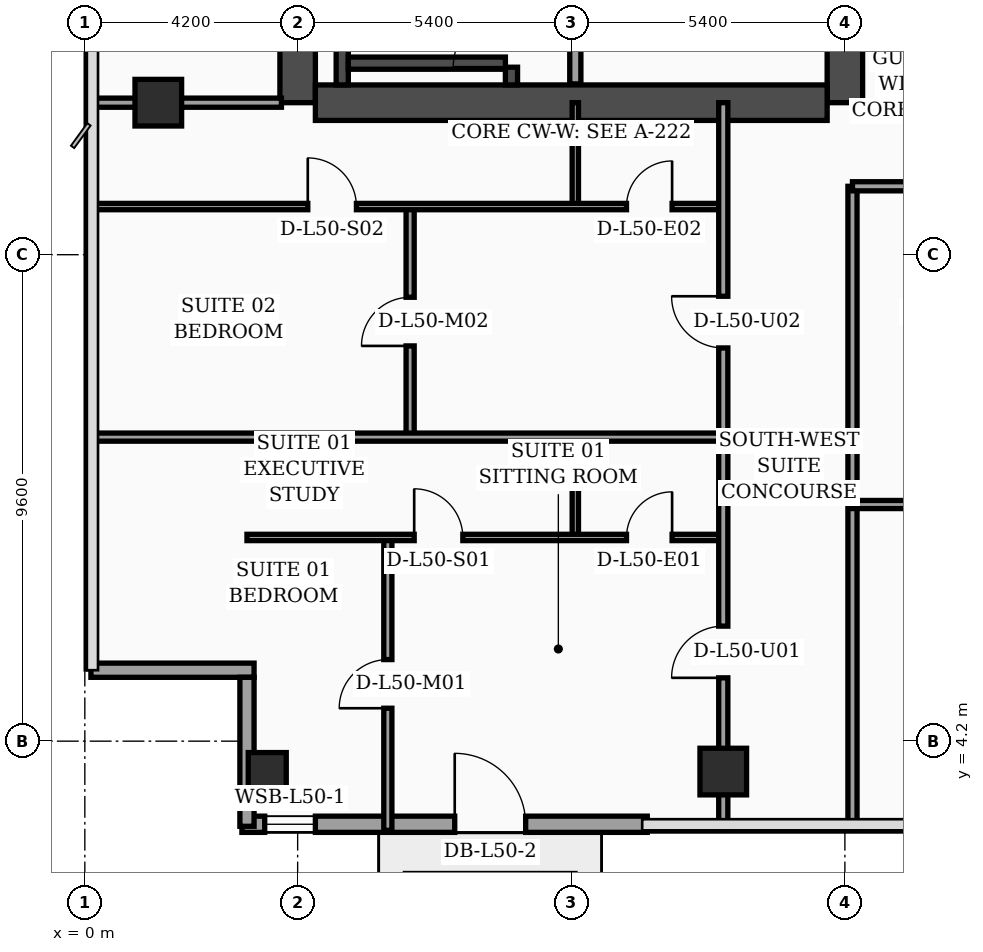
"""IFC4 building model, lengths in metres.
Left out: names, types, materials, properties, quantities, classifications, styles, units other than length and angle.
Written with IfcOpenShell. Run it as: python <this file> out.ifc"""

import sys

from ifc_helpers import new_model, si_unit, direction, frame, frame_2d, origin, origin_2d, place, context, subcontext, project, spatial, rectangle, hollow_rectangle, extrude, element, fill, save


model = new_model("IFC4")
c1 = context("Model", 3, precision=1e-05, world=origin(), true_north=direction((0.0, 1.0)))
c2 = subcontext(c1, "Body", "Model", "MODEL_VIEW")
j1 = project(units=[si_unit("LENGTHUNIT", "METRE"), si_unit("PLANEANGLEUNIT", "RADIAN")], contexts=[c1])
p1 = place(None, origin())
s1 = spatial("IfcSite", under=j1, at=p1, CompositionType="ELEMENT")
p2 = place(p1, origin())
s2 = spatial("IfcBuilding", under=s1, at=p2, CompositionType="ELEMENT")
p3 = place(p2, frame((0.0, 0.0, 203.4)))
s3 = spatial("IfcBuildingStorey", under=s2, at=p3, CompositionType="ELEMENT", Elevation=203.4)
p4 = place(p3, frame((4.2, 16.8, 0.0), z_axis=(0.0, 0.0, 1.0), x_axis=(0.0, 1.0, 0.0)))
e1 = element("IfcWall", 1, at=p4, inside=s3, PredefinedType="SHEAR", context=c2, shape_type="SweptSolid", body=[
    extrude(rectangle(XDim=21.6, YDim=0.7, at=frame_2d((10.8, 0.0))), origin(), (0.0, 0.0, 1.0), 3.56),
])
p5 = place(p3, frame((15.0, 16.8, 0.0), z_axis=(0.0, 0.0, 1.0), x_axis=(0.0, 1.0, 0.0)))
e2 = element("IfcWall", 2, at=p5, inside=s3, PredefinedType="SHEAR", context=c2, shape_type="SweptSolid", body=[
    extrude(rectangle(XDim=21.6, YDim=0.7, at=frame_2d((10.8, 0.0))), origin(), (0.0, 0.0, 1.0), 3.56),
])
p6 = place(p5, frame((8.65, 0.0, 0.0)))
e3 = element("IfcOpeningElement", 3, at=p6, cuts=e2, PredefinedType="OPENING", context=c2, shape_type="SweptSolid", body=[
    extrude(rectangle(XDim=1.1, YDim=2.2, at=frame_2d((0.55, 1.1))), frame((0.0, 0.36, 0.0), z_axis=(0.0, -1.0, 0.0), x_axis=(1.0, 0.0, 0.0)), (0.0, 0.0, 1.0), 0.72),
])
p7 = place(p5, frame((10.85, 0.0, 0.0)))
e4 = element("IfcOpeningElement", 4, at=p7, cuts=e2, PredefinedType="OPENING", context=c2, shape_type="SweptSolid", body=[
    extrude(rectangle(XDim=1.1, YDim=2.2, at=frame_2d((0.55, 1.1))), frame((0.0, 0.36, 0.0), z_axis=(0.0, -1.0, 0.0), x_axis=(1.0, 0.0, 0.0)), (0.0, 0.0, 1.0), 0.72),
])
p8 = place(p5, frame((13.5, 0.0, 0.0)))
e5 = element("IfcOpeningElement", 5, at=p8, cuts=e2, PredefinedType="OPENING", context=c2, shape_type="SweptSolid", body=[
    extrude(rectangle(XDim=1.1, YDim=2.2, at=frame_2d((0.55, 1.1))), frame((0.0, 0.36, 0.0), z_axis=(0.0, -1.0, 0.0), x_axis=(1.0, 0.0, 0.0)), (0.0, 0.0, 1.0), 0.72),
])
p9 = place(p5, frame((16.15, 0.0, 0.0)))
e6 = element("IfcOpeningElement", 6, at=p9, cuts=e2, PredefinedType="OPENING", context=c2, shape_type="SweptSolid", body=[
    extrude(rectangle(XDim=1.1, YDim=2.2, at=frame_2d((0.55, 1.1))), frame((0.0, 0.36, 0.0), z_axis=(0.0, -1.0, 0.0), x_axis=(1.0, 0.0, 0.0)), (0.0, 0.0, 1.0), 0.72),
])
p10 = place(p3, frame((4.55, 16.8, 0.0), z_axis=(0.0, 0.0, 1.0), x_axis=(1.0, 0.0, 0.0)))
e7 = element("IfcWall", 7, at=p10, inside=s3, PredefinedType="SHEAR", context=c2, shape_type="SweptSolid", body=[
    extrude(rectangle(XDim=10.1, YDim=0.7, at=frame_2d((5.05, 0.0))), origin(), (0.0, 0.0, 1.0), 3.56),
])
p11 = place(p3, frame((5.08, 17.15, 0.0), z_axis=(0.0, 0.0, 1.0), x_axis=(0.0, 1.0, 0.0)))
e8 = element("IfcWall", 8, at=p11, inside=s3, PredefinedType="SOLIDWALL", context=c2, shape_type="SweptSolid", body=[
    extrude(rectangle(XDim=9.64, YDim=0.24, at=frame_2d((4.82, 0.0))), origin(), (0.0, 0.0, 1.0), 3.56),
])
p12 = place(p3, frame((8.42, 17.15, 0.0), z_axis=(0.0, 0.0, 1.0), x_axis=(0.0, 1.0, 0.0)))
e9 = element("IfcWall", 9, at=p12, inside=s3, PredefinedType="SOLIDWALL", context=c2, shape_type="SweptSolid", body=[
    extrude(rectangle(XDim=9.64, YDim=0.24, at=frame_2d((4.82, 0.0))), origin(), (0.0, 0.0, 1.0), 3.56),
])
p13 = place(p12, frame((0.35, 0.0, 0.0)))
e10 = element("IfcOpeningElement", 10, at=p13, cuts=e9, PredefinedType="OPENING", context=c2, shape_type="SweptSolid", body=[
    extrude(rectangle(XDim=1.15, YDim=2.2, at=frame_2d((0.575, 1.1))), frame((0.0, 0.13, 0.0), z_axis=(0.0, -1.0, 0.0), x_axis=(1.0, 0.0, 0.0)), (0.0, 0.0, 1.0), 0.26),
])
p14 = place(p3, frame((5.2, 17.58, 0.0), z_axis=(0.0, 0.0, 1.0), x_axis=(1.0, 0.0, 0.0)))
e11 = element("IfcWall", 11, at=p14, inside=s3, PredefinedType="SOLIDWALL", context=c2, shape_type="SweptSolid", body=[
    extrude(rectangle(XDim=3.1, YDim=0.24, at=frame_2d((1.55, 0.0))), origin(), (0.0, 0.0, 1.0), 3.56),
])
p15 = place(p3, frame((3.6, 3.6, 0.0), z_axis=(0.0, 0.0, 1.0), x_axis=(1.0, 0.0, 0.0)))
e12 = element("IfcColumn", 12, at=p15, inside=s3, PredefinedType="COLUMN", context=c2, shape_type="SweptSolid", body=[
    extrude(hollow_rectangle(XDim=0.75, YDim=0.75, WallThickness=0.032, at=origin_2d()), origin(), (0.0, 0.0, 1.0), 3.56),
])
for number, where, z_axis, x_axis in (
    (13, (1.45, 16.8, 0.0), (0.0, 0.0, 1.0), (1.0, 0.0, 0.0)),
    (14, (12.6, 3.6, 0.0), (0.0, 0.0, 1.0), (1.0, 0.0, 0.0)),
):
    element("IfcColumn", number, at=place(p3, frame(where, z_axis=z_axis, x_axis=x_axis)), inside=s3, PredefinedType="COLUMN", context=c2, shape_type="SweptSolid", body=[
        extrude(rectangle(XDim=0.92, YDim=0.92, at=origin_2d()), origin(), (0.0, 0.0, 1.0), 3.56),
    ])
p16 = place(p3, frame((3.1, 2.56, 0.0), z_axis=(0.0, 0.0, 1.0), x_axis=(1.0, 0.0, 0.0)))
e15 = element("IfcWall", 15, at=p16, inside=s3, PredefinedType="SOLIDWALL", context=c2, shape_type="SweptSolid", body=[
    extrude(rectangle(XDim=8.0, YDim=0.32, at=frame_2d((4.0, 0.0))), origin(), (0.0, 0.0, 1.0), 3.56),
])
p17 = place(p16, frame((0.45, 0.0, 0.75)))
e16 = element("IfcOpeningElement", 16, at=p17, cuts=e15, PredefinedType="OPENING", context=c2, shape_type="SweptSolid", body=[
    extrude(rectangle(XDim=1.0, YDim=1.6, at=frame_2d((0.5, 0.8))), frame((0.0, 0.17, 0.0), z_axis=(0.0, -1.0, 0.0), x_axis=(1.0, 0.0, 0.0)), (0.0, 0.0, 1.0), 0.34),
])
p18 = place(p16, frame((4.2, 0.0, 0.0)))
e17 = element("IfcOpeningElement", 17, at=p18, cuts=e15, PredefinedType="OPENING", context=c2, shape_type="SweptSolid", body=[
    extrude(rectangle(XDim=1.4, YDim=2.25, at=frame_2d((0.7, 1.125))), frame((0.0, 0.17, 0.0), z_axis=(0.0, -1.0, 0.0), x_axis=(1.0, 0.0, 0.0)), (0.0, 0.0, 1.0), 0.34),
])
p19 = place(p3, frame((0.12, 5.6, 0.0), z_axis=(0.0, 0.0, 1.0), x_axis=(1.0, 0.0, 0.0)))
e18 = element("IfcWall", 18, at=p19, inside=s3, PredefinedType="SOLIDWALL", context=c2, shape_type="SweptSolid", body=[
    extrude(rectangle(XDim=3.22, YDim=0.28, at=frame_2d((1.61, 0.0))), origin(), (0.0, 0.0, 1.0), 2.94),
])
p20 = place(p3, frame((3.2, 5.46, 0.0), z_axis=(0.0, 0.0, 1.0), x_axis=(0.0, -1.0, 0.0)))
e19 = element("IfcWall", 19, at=p20, inside=s3, PredefinedType="SOLIDWALL", context=c2, shape_type="SweptSolid", body=[
    extrude(rectangle(XDim=2.94, YDim=0.28, at=frame_2d((1.47, 0.0))), origin(), (0.0, 0.0, 1.0), 2.94),
])
p21 = place(p3, frame((9.68, 17.17, 0.0), z_axis=(0.0, 0.0, 1.0), x_axis=(0.0, 1.0, 0.0)))
e20 = element("IfcWall", 20, at=p21, inside=s3, PredefinedType="SOLIDWALL", context=c2, shape_type="SweptSolid", body=[
    extrude(rectangle(XDim=7.83, YDim=0.22, at=frame_2d((3.915, 0.0))), origin(), (0.0, 0.0, 1.0), 3.56),
])
p22 = place(p3, frame((0.08, 16.8, 0.0), z_axis=(0.0, 0.0, 1.0), x_axis=(1.0, 0.0, 0.0)))
e21 = element("IfcWall", 21, at=p22, inside=s3, PredefinedType="PARTITIONING", context=c2, shape_type="SweptSolid", body=[
    extrude(rectangle(XDim=3.8, YDim=0.18, at=frame_2d((1.9, 0.0))), origin(), (0.0, 0.0, 1.0), 2.94),
])
p23 = place(p3, frame((9.68, 8.22, 0.0), z_axis=(0.0, 0.0, 1.0), x_axis=(0.0, 1.0, 0.0)))
e22 = element("IfcWall", 22, at=p23, inside=s3, PredefinedType="PARTITIONING", context=c2, shape_type="SweptSolid", body=[
    extrude(rectangle(XDim=1.98, YDim=0.125, at=frame_2d((0.99, 0.0))), origin(), (0.0, 0.0, 1.0), 3.09),
])
p24 = place(p3, frame((5.98, 2.44, 0.0), z_axis=(0.0, 0.0, 1.0), x_axis=(0.0, 1.0, 0.0)))
e23 = element("IfcWall", 23, at=p24, inside=s3, PredefinedType="PARTITIONING", context=c2, shape_type="SweptSolid", body=[
    extrude(rectangle(XDim=5.78, YDim=0.16, at=frame_2d((2.89, 0.0))), origin(), (0.0, 0.0, 1.0), 3.09),
])
p25 = place(p24, frame((2.41, 0.0, 0.0)))
e24 = element("IfcOpeningElement", 24, at=p25, cuts=e23, PredefinedType="OPENING", context=c2, shape_type="SweptSolid", body=[
    extrude(rectangle(XDim=0.96, YDim=2.2, at=frame_2d((0.48, 1.1))), frame((0.0, 0.09, 0.0), z_axis=(0.0, -1.0, 0.0), x_axis=(1.0, 0.0, 0.0)), (0.0, 0.0, 1.0), 0.18),
])
p26 = place(p3, frame((3.2, 8.22, 0.0), z_axis=(0.0, 0.0, 1.0), x_axis=(1.0, 0.0, 0.0)))
e25 = element("IfcWall", 25, at=p26, inside=s3, PredefinedType="PARTITIONING", context=c2, shape_type="SweptSolid", body=[
    extrude(rectangle(XDim=9.4, YDim=0.125, at=frame_2d((4.7, 0.0))), origin(), (0.0, 0.0, 1.0), 2.94),
])
p27 = place(p26, frame((3.3, 0.0, 0.0)))
e26 = element("IfcOpeningElement", 26, at=p27, cuts=e25, PredefinedType="OPENING", context=c2, shape_type="SweptSolid", body=[
    extrude(rectangle(XDim=0.96, YDim=2.2, at=frame_2d((0.48, 1.1))), frame((0.0, 0.073, 0.0), z_axis=(0.0, -1.0, 0.0), x_axis=(1.0, 0.0, 0.0)), (0.0, 0.0, 1.0), 0.145),
])
p28 = place(p26, frame((7.49, 0.0, 0.0)))
e27 = element("IfcOpeningElement", 27, at=p28, cuts=e25, PredefinedType="OPENING", context=c2, shape_type="SweptSolid", body=[
    extrude(rectangle(XDim=0.9, YDim=2.15, at=frame_2d((0.45, 1.075))), frame((0.0, 0.073, 0.0), z_axis=(0.0, -1.0, 0.0), x_axis=(1.0, 0.0, 0.0)), (0.0, 0.0, 1.0), 0.145),
])
p29 = place(p3, frame((9.68, 14.75, 0.0), z_axis=(0.0, 0.0, 1.0), x_axis=(0.0, 1.0, 0.0)))
e28 = element("IfcWall", 28, at=p29, inside=s3, PredefinedType="PARTITIONING", context=c2, shape_type="SweptSolid", body=[
    extrude(rectangle(XDim=2.05, YDim=0.125, at=frame_2d((1.025, 0.0))), origin(), (0.0, 0.0, 1.0), 3.56),
])
p30 = place(p3, frame((6.42, 10.2, 0.0), z_axis=(0.0, 0.0, 1.0), x_axis=(0.0, 1.0, 0.0)))
e29 = element("IfcWall", 29, at=p30, inside=s3, PredefinedType="PARTITIONING", context=c2, shape_type="SweptSolid", body=[
    extrude(rectangle(XDim=4.55, YDim=0.16, at=frame_2d((2.275, 0.0))), origin(), (0.0, 0.0, 1.0), 3.14),
])
p31 = place(p30, frame((1.8, 0.0, 0.0)))
e30 = element("IfcOpeningElement", 30, at=p31, cuts=e29, PredefinedType="OPENING", context=c2, shape_type="SweptSolid", body=[
    extrude(rectangle(XDim=0.96, YDim=2.2, at=frame_2d((0.48, 1.1))), frame((0.0, 0.09, 0.0), z_axis=(0.0, -1.0, 0.0), x_axis=(1.0, 0.0, 0.0)), (0.0, 0.0, 1.0), 0.18),
])
p32 = place(p3, frame((0.08, 14.75, 0.0), z_axis=(0.0, 0.0, 1.0), x_axis=(1.0, 0.0, 0.0)))
e31 = element("IfcWall", 31, at=p32, inside=s3, PredefinedType="PARTITIONING", context=c2, shape_type="SweptSolid", body=[
    extrude(rectangle(XDim=12.52, YDim=0.125, at=frame_2d((6.26, 0.0))), origin(), (0.0, 0.0, 1.0), 2.94),
])
p33 = place(p32, frame((4.32, 0.0, 0.0)))
e32 = element("IfcOpeningElement", 32, at=p33, cuts=e31, PredefinedType="OPENING", context=c2, shape_type="SweptSolid", body=[
    extrude(rectangle(XDim=0.96, YDim=2.2, at=frame_2d((0.48, 1.1))), frame((0.0, 0.073, 0.0), z_axis=(0.0, -1.0, 0.0), x_axis=(1.0, 0.0, 0.0)), (0.0, 0.0, 1.0), 0.145),
])
p34 = place(p32, frame((10.61, 0.0, 0.0)))
e33 = element("IfcOpeningElement", 33, at=p34, cuts=e31, PredefinedType="OPENING", context=c2, shape_type="SweptSolid", body=[
    extrude(rectangle(XDim=0.9, YDim=2.15, at=frame_2d((0.45, 1.075))), frame((0.0, 0.073, 0.0), z_axis=(0.0, -1.0, 0.0), x_axis=(1.0, 0.0, 0.0)), (0.0, 0.0, 1.0), 0.145),
])
p35 = place(p3, frame((0.08, 10.2, 0.0), z_axis=(0.0, 0.0, 1.0), x_axis=(1.0, 0.0, 0.0)))
e34 = element("IfcWall", 34, at=p35, inside=s3, PredefinedType="PARTITIONING", context=c2, shape_type="SweptSolid", body=[
    extrude(rectangle(XDim=12.52, YDim=0.16, at=frame_2d((6.26, 0.0))), origin(), (0.0, 0.0, 1.0), 2.94),
])
p36 = place(p3, frame((12.6, 2.44, 0.0), z_axis=(0.0, 0.0, 1.0), x_axis=(0.0, 1.0, 0.0)))
e35 = element("IfcWall", 35, at=p36, inside=s3, PredefinedType="PARTITIONING", context=c2, shape_type="SweptSolid", body=[
    extrude(rectangle(XDim=14.36, YDim=0.18, at=frame_2d((7.18, 0.0))), origin(), (0.0, 0.0, 1.0), 2.94),
])
p37 = place(p36, frame((3.01, 0.0, 0.0)))
e36 = element("IfcOpeningElement", 36, at=p37, cuts=e35, PredefinedType="OPENING", context=c2, shape_type="SweptSolid", body=[
    extrude(rectangle(XDim=1.02, YDim=2.2, at=frame_2d((0.51, 1.1))), frame((0.0, 0.1, 0.0), z_axis=(0.0, -1.0, 0.0), x_axis=(1.0, 0.0, 0.0)), (0.0, 0.0, 1.0), 0.2),
])
p38 = place(p36, frame((9.52, 0.0, 0.0)))
e37 = element("IfcOpeningElement", 37, at=p38, cuts=e35, PredefinedType="OPENING", context=c2, shape_type="SweptSolid", body=[
    extrude(rectangle(XDim=1.02, YDim=2.2, at=frame_2d((0.51, 1.1))), frame((0.0, 0.1, 0.0), z_axis=(0.0, -1.0, 0.0), x_axis=(1.0, 0.0, 0.0)), (0.0, 0.0, 1.0), 0.2),
])
p39 = place(p3, frame((15.15, 2.44, 0.0), z_axis=(0.0, 0.0, 1.0), x_axis=(0.0, 1.0, 0.0)))
e38 = element("IfcWall", 38, at=p39, inside=s3, PredefinedType="PARTITIONING", context=c2, shape_type="SweptSolid", body=[
    extrude(rectangle(XDim=12.71, YDim=0.18, at=frame_2d((6.355, 0.0))), origin(), (0.0, 0.0, 1.0), 3.09),
])
p40 = place(p3, frame((15.15, 8.87, 0.0), z_axis=(0.0, 0.0, 1.0), x_axis=(1.0, 0.0, 0.0)))
e39 = element("IfcWall", 39, at=p40, inside=s3, PredefinedType="PARTITIONING", context=c2, shape_type="SweptSolid", body=[
    extrude(rectangle(XDim=4.45, YDim=0.16, at=frame_2d((2.225, 0.0))), origin(), (0.0, 0.0, 1.0), 3.56),
])
p41 = place(p40, frame((1.75, 0.0, 0.0)))
e40 = element("IfcOpeningElement", 40, at=p41, cuts=e39, PredefinedType="OPENING", context=c2, shape_type="SweptSolid", body=[
    extrude(rectangle(XDim=0.96, YDim=2.2, at=frame_2d((0.48, 1.1))), frame((0.0, 0.09, 0.0), z_axis=(0.0, -1.0, 0.0), x_axis=(1.0, 0.0, 0.0)), (0.0, 0.0, 1.0), 0.18),
])
p42 = place(p3, frame((15.15, 15.15, 0.0), z_axis=(0.0, 0.0, 1.0), x_axis=(1.0, 0.0, 0.0)))
e41 = element("IfcWall", 41, at=p42, inside=s3, PredefinedType="PARTITIONING", context=c2, shape_type="SweptSolid", body=[
    extrude(rectangle(XDim=6.45, YDim=0.18, at=frame_2d((3.225, 0.0))), origin(), (0.0, 0.0, 1.0), 2.59),
])
p43 = place(p42, frame((1.74, 0.0, 0.0)))
e42 = element("IfcOpeningElement", 42, at=p43, cuts=e41, PredefinedType="OPENING", context=c2, shape_type="SweptSolid", body=[
    extrude(rectangle(XDim=1.02, YDim=2.2, at=frame_2d((0.51, 1.1))), frame((0.0, 0.1, 0.0), z_axis=(0.0, -1.0, 0.0), x_axis=(1.0, 0.0, 0.0)), (0.0, 0.0, 1.0), 0.2),
])
p44 = place(p17, origin())
e43 = element("IfcWindow", 43, at=p44, inside=s3, PartitioningType="SINGLE_PANEL", PredefinedType="WINDOW", context=c2, shape_type="SweptSolid", body=[
    extrude(rectangle(XDim=1.0, YDim=1.6, at=frame_2d((0.5, 0.8))), frame((0.0, 0.03, 0.0), z_axis=(0.0, -1.0, 0.0), x_axis=(1.0, 0.0, 0.0)), (0.0, 0.0, 1.0), 0.06),
])
fill(e16, e43)
p45 = place(p18, origin())
e44 = element("IfcDoor", 44, at=p45, inside=s3, OperationType="SINGLE_SWING_LEFT", PredefinedType="DOOR", context=c2, shape_type="SweptSolid", body=[
    extrude(rectangle(XDim=1.4, YDim=2.25, at=frame_2d((0.7, 1.125))), frame((0.0, 0.025, 0.0), z_axis=(0.0, -1.0, 0.0), x_axis=(1.0, 0.0, 0.0)), (0.0, 0.0, 1.0), 0.05),
])
fill(e17, e44)
p46 = place(p25, origin())
e45 = element("IfcDoor", 45, at=p46, inside=s3, OperationType="SINGLE_SWING_LEFT", PredefinedType="DOOR", context=c2, shape_type="SweptSolid", body=[
    extrude(rectangle(XDim=0.96, YDim=2.2, at=frame_2d((0.48, 1.1))), frame((0.0, 0.025, 0.0), z_axis=(0.0, -1.0, 0.0), x_axis=(1.0, 0.0, 0.0)), (0.0, 0.0, 1.0), 0.05),
])
fill(e24, e45)
p47 = place(p27, origin())
e46 = element("IfcDoor", 46, at=p47, inside=s3, OperationType="SINGLE_SWING_LEFT", PredefinedType="DOOR", context=c2, shape_type="SweptSolid", body=[
    extrude(rectangle(XDim=0.96, YDim=2.2, at=frame_2d((0.48, 1.1))), frame((0.0, 0.025, 0.0), z_axis=(0.0, -1.0, 0.0), x_axis=(1.0, 0.0, 0.0)), (0.0, 0.0, 1.0), 0.05),
])
fill(e26, e46)
p48 = place(p28, origin())
e47 = element("IfcDoor", 47, at=p48, inside=s3, OperationType="SINGLE_SWING_RIGHT", PredefinedType="DOOR", context=c2, shape_type="SweptSolid", body=[
    extrude(rectangle(XDim=0.9, YDim=2.15, at=frame_2d((0.45, 1.075))), frame((0.0, 0.025, 0.0), z_axis=(0.0, -1.0, 0.0), x_axis=(1.0, 0.0, 0.0)), (0.0, 0.0, 1.0), 0.05),
])
fill(e27, e47)
p49 = place(p31, origin())
e48 = element("IfcDoor", 48, at=p49, inside=s3, OperationType="SINGLE_SWING_LEFT", PredefinedType="DOOR", context=c2, shape_type="SweptSolid", body=[
    extrude(rectangle(XDim=0.96, YDim=2.2, at=frame_2d((0.48, 1.1))), frame((0.0, 0.025, 0.0), z_axis=(0.0, -1.0, 0.0), x_axis=(1.0, 0.0, 0.0)), (0.0, 0.0, 1.0), 0.05),
])
fill(e30, e48)
p50 = place(p33, origin())
e49 = element("IfcDoor", 49, at=p50, inside=s3, OperationType="SINGLE_SWING_LEFT", PredefinedType="DOOR", context=c2, shape_type="SweptSolid", body=[
    extrude(rectangle(XDim=0.96, YDim=2.2, at=frame_2d((0.48, 1.1))), frame((0.0, 0.025, 0.0), z_axis=(0.0, -1.0, 0.0), x_axis=(1.0, 0.0, 0.0)), (0.0, 0.0, 1.0), 0.05),
])
fill(e32, e49)
p51 = place(p34, origin())
e50 = element("IfcDoor", 50, at=p51, inside=s3, OperationType="SINGLE_SWING_RIGHT", PredefinedType="DOOR", context=c2, shape_type="SweptSolid", body=[
    extrude(rectangle(XDim=0.9, YDim=2.15, at=frame_2d((0.45, 1.075))), frame((0.0, 0.025, 0.0), z_axis=(0.0, -1.0, 0.0), x_axis=(1.0, 0.0, 0.0)), (0.0, 0.0, 1.0), 0.05),
])
fill(e33, e50)
p52 = place(p37, origin())
e51 = element("IfcDoor", 51, at=p52, inside=s3, OperationType="SINGLE_SWING_LEFT", PredefinedType="DOOR", context=c2, shape_type="SweptSolid", body=[
    extrude(rectangle(XDim=1.02, YDim=2.2, at=frame_2d((0.51, 1.1))), frame((0.0, 0.025, 0.0), z_axis=(0.0, -1.0, 0.0), x_axis=(1.0, 0.0, 0.0)), (0.0, 0.0, 1.0), 0.05),
])
fill(e36, e51)
p53 = place(p38, origin())
e52 = element("IfcDoor", 52, at=p53, inside=s3, OperationType="SINGLE_SWING_RIGHT", PredefinedType="DOOR", context=c2, shape_type="SweptSolid", body=[
    extrude(rectangle(XDim=1.02, YDim=2.2, at=frame_2d((0.51, 1.1))), frame((0.0, 0.025, 0.0), z_axis=(0.0, -1.0, 0.0), x_axis=(1.0, 0.0, 0.0)), (0.0, 0.0, 1.0), 0.05),
])
fill(e37, e52)
p54 = place(p13, origin())
e53 = element("IfcDoor", 53, at=p54, inside=s3, OperationType="SINGLE_SWING_LEFT", PredefinedType="DOOR", context=c2, shape_type="SweptSolid", body=[
    extrude(rectangle(XDim=1.15, YDim=2.2, at=frame_2d((0.575, 1.1))), frame((0.0, 0.025, 0.0), z_axis=(0.0, -1.0, 0.0), x_axis=(1.0, 0.0, 0.0)), (0.0, 0.0, 1.0), 0.05),
])
fill(e10, e53)
save(model, sys.argv[1])
